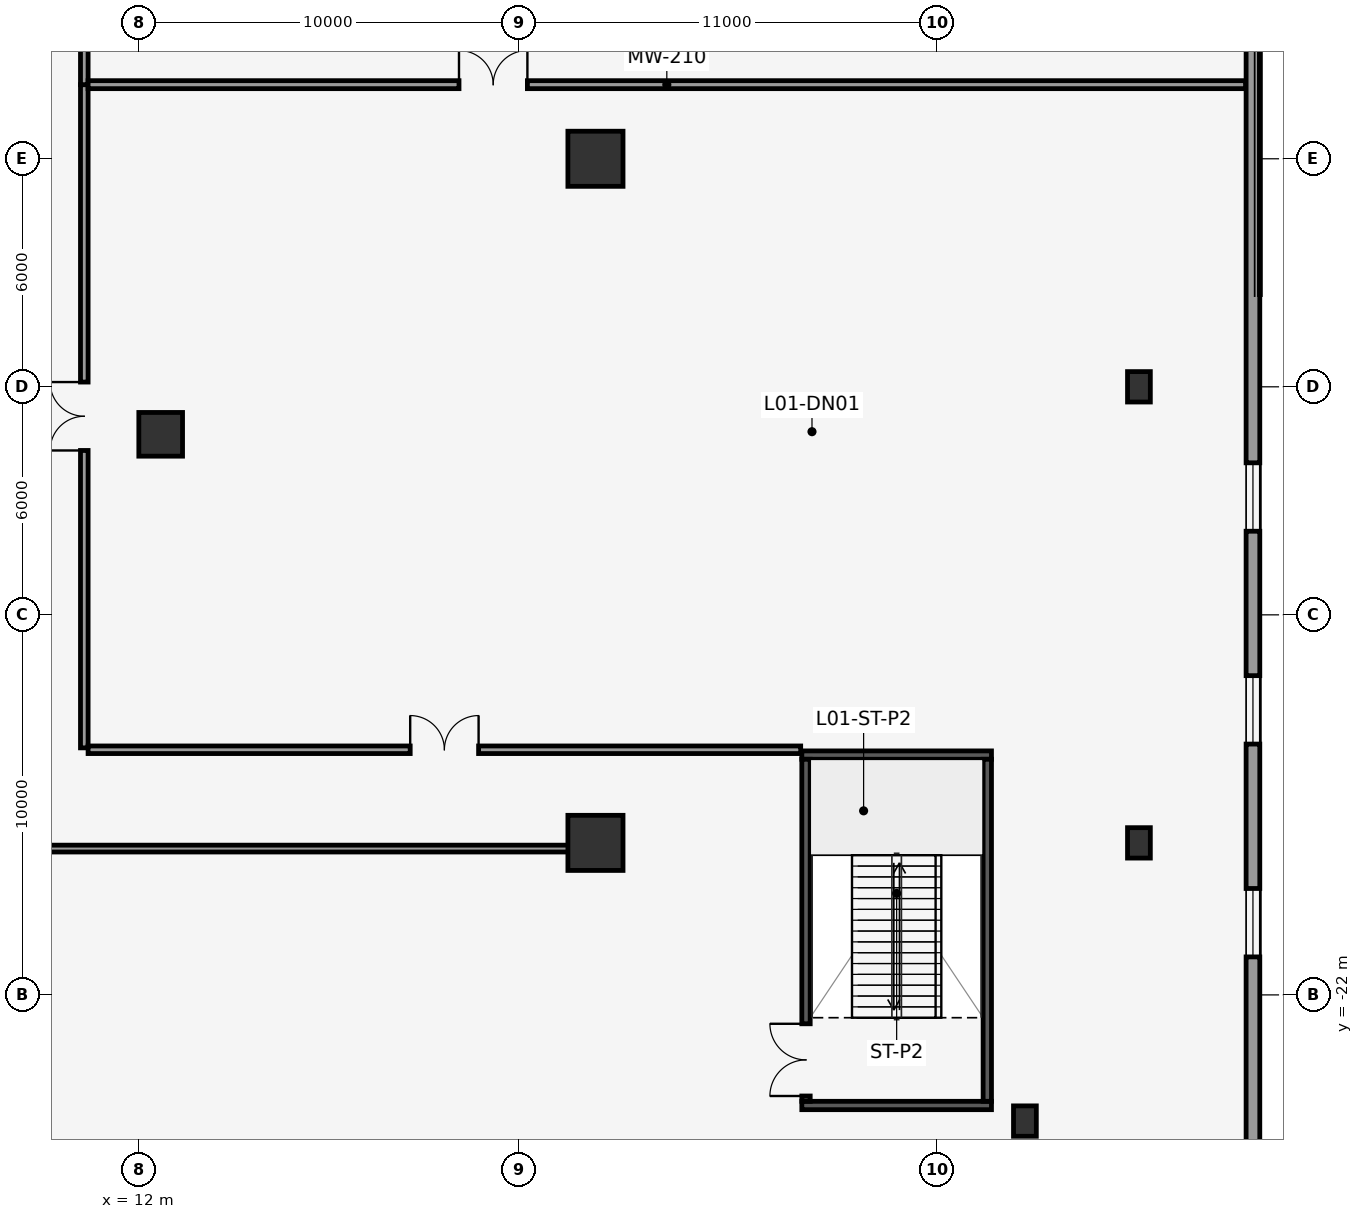
"""IFC4 building model, lengths in metres.
Left out: names, types, materials, properties, quantities, classifications, styles, units other than length and angle.
Written with IfcOpenShell. Run it as: python <this file> out.ifc"""

import sys

from ifc_helpers import new_model, si_unit, direction, frame, frame_2d, origin, origin_2d, place, context, subcontext, project, spatial, rectangle, hollow_rectangle, extrude, element, fill, save


model = new_model("IFC4")
c1 = context("Model", 3, precision=1e-05, world=origin(), true_north=direction((0.0, 1.0)))
c2 = subcontext(c1, "Body", "Model", "MODEL_VIEW")
j1 = project(units=[si_unit("LENGTHUNIT", "METRE"), si_unit("PLANEANGLEUNIT", "RADIAN")], contexts=[c1])
p1 = place(None, origin())
s1 = spatial("IfcSite", under=j1, at=p1, CompositionType="ELEMENT")
p2 = place(p1, origin())
s2 = spatial("IfcBuilding", under=s1, at=p2, CompositionType="ELEMENT")
p3 = place(p2, frame((0.0, 0.0, 6.0)))
s3 = spatial("IfcBuildingStorey", under=s2, at=p3, CompositionType="ELEMENT", Elevation=6.0)
p4 = place(p3, frame((12.56, -7.25, 0.0), z_axis=(0.0, 0.0, 1.0), x_axis=(1.0, 0.0, 0.0)))
e1 = element("IfcColumn", 1, at=p4, inside=s3, PredefinedType="COLUMN", context=c2, shape_type="SweptSolid", body=[
    extrude(rectangle(XDim=1.15, YDim=1.15, at=origin_2d()), origin(), (0.0, 0.0, 1.0), 5.5),
])
for number, where, z_axis, x_axis in (
    (2, (24.0, -18.0, 0.0), (0.0, 0.0, 1.0), (1.0, 0.0, 0.0)),
    (3, (24.0, 0.0, 0.0), (0.0, 0.0, 1.0), (1.0, 0.0, 0.0)),
):
    element("IfcColumn", number, at=place(p3, frame(where, z_axis=z_axis, x_axis=x_axis)), inside=s3, PredefinedType="COLUMN", context=c2, shape_type="SweptSolid", body=[
        extrude(rectangle(XDim=1.45, YDim=1.45, at=origin_2d()), origin(), (0.0, 0.0, 1.0), 5.5),
    ])
for number, where, z_axis, x_axis in (
    (4, (38.3, -18.0, 0.0), (0.0, 0.0, 1.0), (1.0, 0.0, 0.0)),
    (5, (38.3, -6.0, 0.0), (0.0, 0.0, 1.0), (1.0, 0.0, 0.0)),
    (6, (35.3, -25.32, 0.0), (0.0, 0.0, 1.0), (1.0, 0.0, 0.0)),
):
    element("IfcColumn", number, at=place(p3, frame(where, z_axis=z_axis, x_axis=x_axis)), inside=s3, PredefinedType="COLUMN", context=c2, shape_type="SweptSolid", body=[
        extrude(hollow_rectangle(XDim=0.6, YDim=0.8, WallThickness=0.05, at=origin_2d()), origin(), (0.0, 0.0, 1.0), 5.5),
    ])
p5 = place(p3, frame((41.3, 30.3, 0.0), z_axis=(0.0, 0.0, 1.0), x_axis=(0.0, -1.0, 0.0)))
e7 = element("IfcWall", 7, at=p5, inside=s3, PredefinedType="STANDARD", context=c2, shape_type="SweptSolid", body=[
    extrude(rectangle(XDim=60.6, YDim=0.36, at=frame_2d((30.3, 0.0))), origin(), (0.0, 0.0, 1.0), 5.2),
])
p6 = place(p5, frame((4.7, 0.0, 0.9)))
e8 = element("IfcOpeningElement", 8, at=p6, cuts=e7, PredefinedType="OPENING", context=c2, shape_type="SweptSolid", body=[
    extrude(rectangle(XDim=1.8, YDim=2.6, at=frame_2d((0.9, 1.3))), frame((0.0, 0.19, 0.0), z_axis=(0.0, -1.0, 0.0), x_axis=(1.0, 0.0, 0.0)), (0.0, 0.0, 1.0), 0.38),
])
p7 = place(p5, frame((10.3, 0.0, 0.9)))
e9 = element("IfcOpeningElement", 9, at=p7, cuts=e7, PredefinedType="OPENING", context=c2, shape_type="SweptSolid", body=[
    extrude(rectangle(XDim=1.8, YDim=2.6, at=frame_2d((0.9, 1.3))), frame((0.0, 0.19, 0.0), z_axis=(0.0, -1.0, 0.0), x_axis=(1.0, 0.0, 0.0)), (0.0, 0.0, 1.0), 0.38),
])
p8 = place(p5, frame((15.9, 0.0, 0.9)))
e10 = element("IfcOpeningElement", 10, at=p8, cuts=e7, PredefinedType="OPENING", context=c2, shape_type="SweptSolid", body=[
    extrude(rectangle(XDim=1.8, YDim=2.6, at=frame_2d((0.9, 1.3))), frame((0.0, 0.19, 0.0), z_axis=(0.0, -1.0, 0.0), x_axis=(1.0, 0.0, 0.0)), (0.0, 0.0, 1.0), 0.38),
])
p9 = place(p5, frame((21.5, 0.0, 0.9)))
e11 = element("IfcOpeningElement", 11, at=p9, cuts=e7, PredefinedType="OPENING", context=c2, shape_type="SweptSolid", body=[
    extrude(rectangle(XDim=1.8, YDim=2.6, at=frame_2d((0.9, 1.3))), frame((0.0, 0.19, 0.0), z_axis=(0.0, -1.0, 0.0), x_axis=(1.0, 0.0, 0.0)), (0.0, 0.0, 1.0), 0.38),
])
p10 = place(p5, frame((38.3, 0.0, 0.9)))
e12 = element("IfcOpeningElement", 12, at=p10, cuts=e7, PredefinedType="OPENING", context=c2, shape_type="SweptSolid", body=[
    extrude(rectangle(XDim=1.8, YDim=2.6, at=frame_2d((0.9, 1.3))), frame((0.0, 0.19, 0.0), z_axis=(0.0, -1.0, 0.0), x_axis=(1.0, 0.0, 0.0)), (0.0, 0.0, 1.0), 0.38),
])
p11 = place(p5, frame((43.9, 0.0, 0.9)))
e13 = element("IfcOpeningElement", 13, at=p11, cuts=e7, PredefinedType="OPENING", context=c2, shape_type="SweptSolid", body=[
    extrude(rectangle(XDim=1.8, YDim=2.6, at=frame_2d((0.9, 1.3))), frame((0.0, 0.19, 0.0), z_axis=(0.0, -1.0, 0.0), x_axis=(1.0, 0.0, 0.0)), (0.0, 0.0, 1.0), 0.38),
])
p12 = place(p5, frame((49.5, 0.0, 0.9)))
e14 = element("IfcOpeningElement", 14, at=p12, cuts=e7, PredefinedType="OPENING", context=c2, shape_type="SweptSolid", body=[
    extrude(rectangle(XDim=1.8, YDim=2.6, at=frame_2d((0.9, 1.3))), frame((0.0, 0.19, 0.0), z_axis=(0.0, -1.0, 0.0), x_axis=(1.0, 0.0, 0.0)), (0.0, 0.0, 1.0), 0.38),
])
for number, where, z_axis, x_axis in (
    (15, (29.43, -24.91, 0.0), (0.0, 0.0, 1.0), (1.0, 0.0, 0.0)),
    (16, (29.43, -15.69, 0.0), (0.0, 0.0, 1.0), (1.0, 0.0, 0.0)),
):
    element("IfcWall", number, at=place(p3, frame(where, z_axis=z_axis, x_axis=x_axis)), inside=s3, PredefinedType="SHEAR", context=c2, shape_type="SweptSolid", body=[
        extrude(rectangle(XDim=4.99, YDim=0.22, at=frame_2d((2.495, 0.0))), origin(), (0.0, 0.0, 1.0), 5.2),
    ])
p13 = place(p3, frame((29.54, -24.8, 0.0), z_axis=(0.0, 0.0, 1.0), x_axis=(0.0, 1.0, 0.0)))
e17 = element("IfcWall", 17, at=p13, inside=s3, PredefinedType="SHEAR", context=c2, shape_type="SweptSolid", body=[
    extrude(rectangle(XDim=9.0, YDim=0.22, at=frame_2d((4.5, 0.0))), origin(), (0.0, 0.0, 1.0), 5.2),
])
p14 = place(p13, frame((0.14, 0.0, 0.0)))
e18 = element("IfcOpeningElement", 18, at=p14, cuts=e17, PredefinedType="OPENING", context=c2, shape_type="SweptSolid", body=[
    extrude(rectangle(XDim=1.9, YDim=2.2, at=frame_2d((0.95, 1.1))), frame((0.0, 0.12, 0.0), z_axis=(0.0, -1.0, 0.0), x_axis=(1.0, 0.0, 0.0)), (0.0, 0.0, 1.0), 0.24),
])
p15 = place(p3, frame((34.31, -24.8, 0.0), z_axis=(0.0, 0.0, 1.0), x_axis=(0.0, 1.0, 0.0)))
e19 = element("IfcWall", 19, at=p15, inside=s3, PredefinedType="SHEAR", context=c2, shape_type="SweptSolid", body=[
    extrude(rectangle(XDim=9.0, YDim=0.22, at=frame_2d((4.5, 0.0))), origin(), (0.0, 0.0, 1.0), 5.2),
])
p16 = place(p3, frame((10.55, -15.5, 0.0), z_axis=(0.0, 0.0, 1.0), x_axis=(0.0, 1.0, 0.0)))
e20 = element("IfcWall", 20, at=p16, inside=s3, PredefinedType="PARTITIONING", context=c2, shape_type="SweptSolid", body=[
    extrude(rectangle(XDim=17.45, YDim=0.2, at=frame_2d((8.725, 0.0))), origin(), (0.0, 0.0, 1.0), 5.2),
])
p17 = place(p16, frame((7.825, 0.0, 0.0)))
e21 = element("IfcOpeningElement", 21, at=p17, cuts=e20, PredefinedType="OPENING", context=c2, shape_type="SweptSolid", body=[
    extrude(rectangle(XDim=1.8, YDim=2.2, at=frame_2d((0.9, 1.1))), frame((0.0, 0.11, 0.0), z_axis=(0.0, -1.0, 0.0), x_axis=(1.0, 0.0, 0.0)), (0.0, 0.0, 1.0), 0.22),
])
p18 = place(p3, frame((10.55, 1.95, 0.0), z_axis=(0.0, 0.0, 1.0), x_axis=(0.0, 1.0, 0.0)))
e22 = element("IfcWall", 22, at=p18, inside=s3, PredefinedType="PARTITIONING", context=c2, shape_type="SweptSolid", body=[
    extrude(rectangle(XDim=13.55, YDim=0.2, at=frame_2d((6.775, 0.0))), origin(), (0.0, 0.0, 1.0), 5.2),
])
p19 = place(p18, frame((5.875, 0.0, 0.0)))
e23 = element("IfcOpeningElement", 23, at=p19, cuts=e22, PredefinedType="OPENING", context=c2, shape_type="SweptSolid", body=[
    extrude(rectangle(XDim=1.8, YDim=2.2, at=frame_2d((0.9, 1.1))), frame((0.0, 0.11, 0.0), z_axis=(0.0, -1.0, 0.0), x_axis=(1.0, 0.0, 0.0)), (0.0, 0.0, 1.0), 0.22),
])
p20 = place(p3, frame((10.65, 1.95, 0.0), z_axis=(0.0, 0.0, 1.0), x_axis=(1.0, 0.0, 0.0)))
e24 = element("IfcWall", 24, at=p20, inside=s3, PredefinedType="MOVABLE", context=c2, shape_type="SweptSolid", body=[
    extrude(rectangle(XDim=30.455, YDim=0.21, at=frame_2d((15.228, 0.0))), origin(), (0.0, 0.0, 1.0), 5.2),
])
p21 = place(p20, frame((9.759, 0.0, 0.0)))
e25 = element("IfcOpeningElement", 25, at=p21, cuts=e24, PredefinedType="OPENING", context=c2, shape_type="SweptSolid", body=[
    extrude(rectangle(XDim=1.8, YDim=2.2, at=frame_2d((0.9, 1.1))), frame((0.0, 0.115, 0.0), z_axis=(0.0, -1.0, 0.0), x_axis=(1.0, 0.0, 0.0)), (0.0, 0.0, 1.0), 0.23),
])
p22 = place(p3, frame((10.65, -15.55, 0.0), z_axis=(0.0, 0.0, 1.0), x_axis=(1.0, 0.0, 0.0)))
e26 = element("IfcWall", 26, at=p22, inside=s3, PredefinedType="PARTITIONING", context=c2, shape_type="SweptSolid", body=[
    extrude(rectangle(XDim=18.75, YDim=0.2, at=frame_2d((9.375, 0.0))), origin(), (0.0, 0.0, 1.0), 5.2),
])
p23 = place(p22, frame((8.475, 0.0, 0.0)))
e27 = element("IfcOpeningElement", 27, at=p23, cuts=e26, PredefinedType="OPENING", context=c2, shape_type="SweptSolid", body=[
    extrude(rectangle(XDim=1.8, YDim=2.2, at=frame_2d((0.9, 1.1))), frame((0.0, 0.11, 0.0), z_axis=(0.0, -1.0, 0.0), x_axis=(1.0, 0.0, 0.0)), (0.0, 0.0, 1.0), 0.22),
])
p24 = place(p3, frame((-23.6, -18.15, 0.0), z_axis=(0.0, 0.0, 1.0), x_axis=(1.0, 0.0, 0.0)))
e28 = element("IfcWall", 28, at=p24, inside=s3, PredefinedType="PARTITIONING", context=c2, shape_type="SweptSolid", body=[
    extrude(rectangle(XDim=47.2, YDim=0.18, at=frame_2d((23.6, 0.0))), origin(), (0.0, 0.0, 1.0), 3.38),
])
p25 = place(p24, frame((13.26, 0.0, 0.0)))
e29 = element("IfcOpeningElement", 29, at=p25, cuts=e28, PredefinedType="OPENING", context=c2, shape_type="SweptSolid", body=[
    extrude(rectangle(XDim=1.8, YDim=2.2, at=frame_2d((0.9, 1.1))), frame((0.0, 0.1, 0.0), z_axis=(0.0, -1.0, 0.0), x_axis=(1.0, 0.0, 0.0)), (0.0, 0.0, 1.0), 0.2),
])
p26 = place(p10, origin())
e30 = element("IfcWindow", 30, at=p26, inside=s3, PartitioningType="DOUBLE_PANEL_VERTICAL", PredefinedType="WINDOW", context=c2, shape_type="SweptSolid", body=[
    extrude(rectangle(XDim=1.8, YDim=2.6, at=frame_2d((0.9, 1.3))), frame((0.0, 0.03, 0.0), z_axis=(0.0, -1.0, 0.0), x_axis=(1.0, 0.0, 0.0)), (0.0, 0.0, 1.0), 0.06),
])
fill(e12, e30)
p27 = place(p11, origin())
e31 = element("IfcWindow", 31, at=p27, inside=s3, PartitioningType="DOUBLE_PANEL_VERTICAL", PredefinedType="WINDOW", context=c2, shape_type="SweptSolid", body=[
    extrude(rectangle(XDim=1.8, YDim=2.6, at=frame_2d((0.9, 1.3))), frame((0.0, 0.03, 0.0), z_axis=(0.0, -1.0, 0.0), x_axis=(1.0, 0.0, 0.0)), (0.0, 0.0, 1.0), 0.06),
])
fill(e13, e31)
p28 = place(p12, origin())
e32 = element("IfcWindow", 32, at=p28, inside=s3, PartitioningType="DOUBLE_PANEL_VERTICAL", PredefinedType="WINDOW", context=c2, shape_type="SweptSolid", body=[
    extrude(rectangle(XDim=1.8, YDim=2.6, at=frame_2d((0.9, 1.3))), frame((0.0, 0.03, 0.0), z_axis=(0.0, -1.0, 0.0), x_axis=(1.0, 0.0, 0.0)), (0.0, 0.0, 1.0), 0.06),
])
fill(e14, e32)
p29 = place(p14, origin())
e33 = element("IfcDoor", 33, at=p29, inside=s3, OperationType="DOUBLE_DOOR_SINGLE_SWING", PredefinedType="DOOR", context=c2, shape_type="SweptSolid", body=[
    extrude(rectangle(XDim=1.9, YDim=2.2, at=frame_2d((0.95, 1.1))), frame((0.0, 0.025, 0.0), z_axis=(0.0, -1.0, 0.0), x_axis=(1.0, 0.0, 0.0)), (0.0, 0.0, 1.0), 0.05),
])
fill(e18, e33)
p30 = place(p17, origin())
e34 = element("IfcDoor", 34, at=p30, inside=s3, OperationType="DOUBLE_DOOR_SINGLE_SWING", PredefinedType="DOOR", context=c2, shape_type="SweptSolid", body=[
    extrude(rectangle(XDim=1.8, YDim=2.2, at=frame_2d((0.9, 1.1))), frame((0.0, 0.025, 0.0), z_axis=(0.0, -1.0, 0.0), x_axis=(1.0, 0.0, 0.0)), (0.0, 0.0, 1.0), 0.05),
])
fill(e21, e34)
p31 = place(p21, origin())
e35 = element("IfcDoor", 35, at=p31, inside=s3, OperationType="DOUBLE_DOOR_SINGLE_SWING", PredefinedType="DOOR", context=c2, shape_type="SweptSolid", body=[
    extrude(rectangle(XDim=1.8, YDim=2.2, at=frame_2d((0.9, 1.1))), frame((0.0, 0.025, 0.0), z_axis=(0.0, -1.0, 0.0), x_axis=(1.0, 0.0, 0.0)), (0.0, 0.0, 1.0), 0.05),
])
fill(e25, e35)
p32 = place(p23, origin())
e36 = element("IfcDoor", 36, at=p32, inside=s3, OperationType="DOUBLE_DOOR_SINGLE_SWING", PredefinedType="DOOR", context=c2, shape_type="SweptSolid", body=[
    extrude(rectangle(XDim=1.8, YDim=2.2, at=frame_2d((0.9, 1.1))), frame((0.0, 0.025, 0.0), z_axis=(0.0, -1.0, 0.0), x_axis=(1.0, 0.0, 0.0)), (0.0, 0.0, 1.0), 0.05),
])
fill(e27, e36)
save(model, sys.argv[1])
